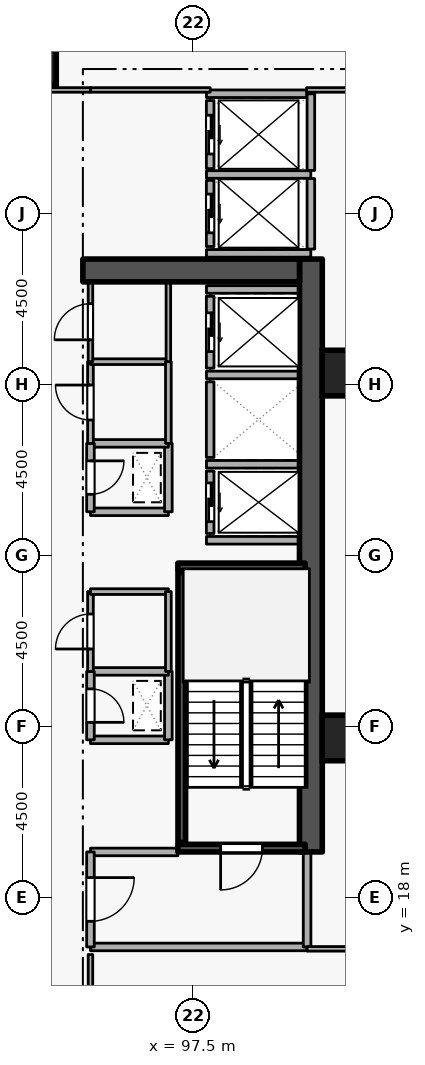
"""IFC4 building model, lengths in metres.
Left out: names, types, materials, properties, quantities, classifications, styles, units other than length and angle.
Written with IfcOpenShell. Run it as: python <this file> out.ifc"""

import sys

from ifc_helpers import new_model, si_unit, direction, frame, frame_2d, origin, origin_2d, place, context, subcontext, project, spatial, rectangle, extrude, element, fill, save


model = new_model("IFC4")
c1 = context("Model", 3, precision=1e-05, world=origin(), true_north=direction((0.0, 1.0)))
c2 = subcontext(c1, "Body", "Model", "MODEL_VIEW")
j1 = project(units=[si_unit("LENGTHUNIT", "METRE"), si_unit("PLANEANGLEUNIT", "RADIAN")], contexts=[c1])
p1 = place(None, origin())
s1 = spatial("IfcSite", under=j1, at=p1, CompositionType="ELEMENT")
p2 = place(p1, origin())
s2 = spatial("IfcBuilding", under=s1, at=p2, CompositionType="ELEMENT")
p3 = place(p2, frame((0.0, 0.0, 112.5)))
s3 = spatial("IfcBuildingStorey", under=s2, at=p3, CompositionType="ELEMENT", Elevation=112.5)
p4 = place(p3, frame((100.6, 19.2, 0.0), z_axis=(0.0, 0.0, 1.0), x_axis=(0.0, 1.0, 0.0)))
e1 = element("IfcWall", 1, at=p4, inside=s3, PredefinedType="SHEAR", context=c2, shape_type="SweptSolid", body=[
    extrude(rectangle(XDim=15.6, YDim=0.6, at=frame_2d((7.8, 0.0))), origin(), (0.0, 0.0, 1.0), 3.6),
])
p5 = place(p3, frame((94.6, 34.5, 0.0), z_axis=(0.0, 0.0, 1.0), x_axis=(1.0, 0.0, 0.0)))
e2 = element("IfcWall", 2, at=p5, inside=s3, PredefinedType="SHEAR", context=c2, shape_type="SweptSolid", body=[
    extrude(rectangle(XDim=5.7, YDim=0.6, at=frame_2d((2.85, 0.0))), origin(), (0.0, 0.0, 1.0), 3.6),
])
for number, where, z_axis, x_axis in (
    (3, (93.3, 40.0, 0.0), (0.0, 0.0, 1.0), (1.0, 0.0, 0.0)),
    (4, (101.5, 22.2, 0.0), (0.0, 0.0, 1.0), (1.0, 0.0, 0.0)),
    (5, (101.5, 31.8, 0.0), (0.0, 0.0, 1.0), (1.0, 0.0, 0.0)),
):
    element("IfcColumn", number, at=place(p3, frame(where, z_axis=z_axis, x_axis=x_axis)), inside=s3, PredefinedType="COLUMN", context=c2, shape_type="SweptSolid", body=[
        extrude(rectangle(XDim=1.2, YDim=1.2, at=origin_2d()), origin(), (0.0, 0.0, 1.0), 3.6),
    ])
p6 = place(p3, frame((97.95, 29.22, 0.0), z_axis=(0.0, 0.0, 1.0), x_axis=(0.0, -1.0, 0.0)))
e6 = element("IfcWall", 6, at=p6, inside=s3, PredefinedType="STANDARD", context=c2, shape_type="SweptSolid", body=[
    extrude(rectangle(XDim=1.64, YDim=0.2, at=frame_2d((0.82, 0.0))), origin(), (0.0, 0.0, 1.0), 3.34),
])
p7 = place(p6, frame((0.31, 0.0, 0.0)))
e7 = element("IfcOpeningElement", 7, at=p7, cuts=e6, PredefinedType="OPENING", context=c2, shape_type="SweptSolid", body=[
    extrude(rectangle(XDim=1.02, YDim=2.06, at=frame_2d((0.51, 1.03))), frame((0.0, 0.11, 0.0), z_axis=(0.0, -1.0, 0.0), x_axis=(1.0, 0.0, 0.0)), (0.0, 0.0, 1.0), 0.22),
])
p8 = place(p3, frame((97.95, 31.57, 0.0), z_axis=(0.0, 0.0, 1.0), x_axis=(0.0, -1.0, 0.0)))
e8 = element("IfcWall", 8, at=p8, inside=s3, PredefinedType="STANDARD", context=c2, shape_type="SweptSolid", body=[
    extrude(rectangle(XDim=1.99, YDim=0.2, at=frame_2d((0.995, 0.0))), origin(), (0.0, 0.0, 1.0), 3.34),
])
p9 = place(p3, frame((97.95, 33.82, 0.0), z_axis=(0.0, 0.0, 1.0), x_axis=(0.0, -1.0, 0.0)))
e9 = element("IfcWall", 9, at=p9, inside=s3, PredefinedType="STANDARD", context=c2, shape_type="SweptSolid", body=[
    extrude(rectangle(XDim=1.89, YDim=0.2, at=frame_2d((0.945, 0.0))), origin(), (0.0, 0.0, 1.0), 3.34),
])
p10 = place(p9, frame((0.435, 0.0, 0.0)))
e10 = element("IfcOpeningElement", 10, at=p10, cuts=e9, PredefinedType="OPENING", context=c2, shape_type="SweptSolid", body=[
    extrude(rectangle(XDim=1.02, YDim=2.06, at=frame_2d((0.51, 1.03))), frame((0.0, 0.11, 0.0), z_axis=(0.0, -1.0, 0.0), x_axis=(1.0, 0.0, 0.0)), (0.0, 0.0, 1.0), 0.22),
])
p11 = place(p3, frame((97.95, 36.87, 0.0), z_axis=(0.0, 0.0, 1.0), x_axis=(0.0, -1.0, 0.0)))
e11 = element("IfcWall", 11, at=p11, inside=s3, PredefinedType="STANDARD", context=c2, shape_type="SweptSolid", body=[
    extrude(rectangle(XDim=1.74, YDim=0.2, at=frame_2d((0.87, 0.0))), origin(), (0.0, 0.0, 1.0), 3.34),
])
p12 = place(p11, frame((0.36, 0.0, 0.0)))
e12 = element("IfcOpeningElement", 12, at=p12, cuts=e11, PredefinedType="OPENING", context=c2, shape_type="SweptSolid", body=[
    extrude(rectangle(XDim=1.02, YDim=2.06, at=frame_2d((0.51, 1.03))), frame((0.0, 0.11, 0.0), z_axis=(0.0, -1.0, 0.0), x_axis=(1.0, 0.0, 0.0)), (0.0, 0.0, 1.0), 0.22),
])
p13 = place(p3, frame((97.95, 38.97, 0.0), z_axis=(0.0, 0.0, 1.0), x_axis=(0.0, -1.0, 0.0)))
e13 = element("IfcWall", 13, at=p13, inside=s3, PredefinedType="STANDARD", context=c2, shape_type="SweptSolid", body=[
    extrude(rectangle(XDim=1.79, YDim=0.2, at=frame_2d((0.895, 0.0))), origin(), (0.0, 0.0, 1.0), 3.34),
])
p14 = place(p13, frame((0.385, 0.0, 0.0)))
e14 = element("IfcOpeningElement", 14, at=p14, cuts=e13, PredefinedType="OPENING", context=c2, shape_type="SweptSolid", body=[
    extrude(rectangle(XDim=1.02, YDim=2.06, at=frame_2d((0.51, 1.03))), frame((0.0, 0.11, 0.0), z_axis=(0.0, -1.0, 0.0), x_axis=(1.0, 0.0, 0.0)), (0.0, 0.0, 1.0), 0.22),
])
for number, where, z_axis, x_axis in (
    (15, (97.852, 29.4, 0.0), (0.0, 0.0, 1.0), (1.0, 0.0, 0.0)),
    (16, (97.852, 27.4, 0.0), (0.0, 0.0, 1.0), (1.0, 0.0, 0.0)),
    (17, (97.852, 31.75, 0.0), (0.0, 0.0, 1.0), (1.0, 0.0, 0.0)),
    (18, (97.852, 34.0, 0.0), (0.0, 0.0, 1.0), (1.0, 0.0, 0.0)),
):
    element("IfcWall", number, at=place(p3, frame(where, z_axis=z_axis, x_axis=x_axis)), inside=s3, PredefinedType="STANDARD", context=c2, shape_type="SweptSolid", body=[
        extrude(rectangle(XDim=2.436, YDim=0.2, at=frame_2d((1.218, 0.0))), origin(), (0.0, 0.0, 1.0), 3.34),
    ])
for number, where, z_axis, x_axis in (
    (19, (97.852, 37.025, 0.0), (0.0, 0.0, 1.0), (1.0, 0.0, 0.0)),
    (20, (97.852, 34.95, 0.0), (0.0, 0.0, 1.0), (1.0, 0.0, 0.0)),
):
    element("IfcWall", number, at=place(p3, frame(where, z_axis=z_axis, x_axis=x_axis)), inside=s3, PredefinedType="STANDARD", context=c2, shape_type="SweptSolid", body=[
        extrude(rectangle(XDim=2.746, YDim=0.2, at=frame_2d((1.373, 0.0))), origin(), (0.0, 0.0, 1.0), 3.34),
    ])
p15 = place(p3, frame((100.6, 35.062, 0.0), z_axis=(0.0, 0.0, 1.0), x_axis=(0.0, 1.0, 0.0)))
e21 = element("IfcWall", 21, at=p15, inside=s3, PredefinedType="STANDARD", context=c2, shape_type="SweptSolid", body=[
    extrude(rectangle(XDim=1.856, YDim=0.2, at=frame_2d((0.928, 0.0))), origin(), (0.0, 0.0, 1.0), 3.34),
])
p16 = place(p3, frame((100.6, 37.132, 0.0), z_axis=(0.0, 0.0, 1.0), x_axis=(0.0, 1.0, 0.0)))
e22 = element("IfcWall", 22, at=p16, inside=s3, PredefinedType="STANDARD", context=c2, shape_type="SweptSolid", body=[
    extrude(rectangle(XDim=2.016, YDim=0.2, at=frame_2d((1.008, 0.0))), origin(), (0.0, 0.0, 1.0), 3.34),
])
p17 = place(p3, frame((97.852, 39.15, 0.0), z_axis=(0.0, 0.0, 1.0), x_axis=(1.0, 0.0, 0.0)))
e23 = element("IfcWall", 23, at=p17, inside=s3, PredefinedType="STANDARD", context=c2, shape_type="SweptSolid", body=[
    extrude(rectangle(XDim=2.636, YDim=0.2, at=frame_2d((1.318, 0.0))), origin(), (0.0, 0.0, 1.0), 3.34),
])
p18 = place(p3, frame((100.45, 19.3, 0.0), z_axis=(0.0, 0.0, 1.0), x_axis=(-1.0, 0.0, 0.0)))
e24 = element("IfcWall", 24, at=p18, inside=s3, PredefinedType="SHEAR", context=c2, shape_type="SweptSolid", body=[
    extrude(rectangle(XDim=3.35, YDim=0.2, at=frame_2d((1.675, 0.0))), origin(), (0.0, 0.0, 1.0), 3.6),
])
p19 = place(p18, frame((1.125, 0.0, 0.0)))
e25 = element("IfcOpeningElement", 25, at=p19, cuts=e24, PredefinedType="OPENING", context=c2, shape_type="SweptSolid", body=[
    extrude(rectangle(XDim=1.1, YDim=2.1, at=frame_2d((0.55, 1.05))), frame((0.0, 0.11, 0.0), z_axis=(0.0, -1.0, 0.0), x_axis=(1.0, 0.0, 0.0)), (0.0, 0.0, 1.0), 0.22),
])
p20 = place(p3, frame((97.1, 26.7, 0.0), z_axis=(0.0, 0.0, 1.0), x_axis=(1.0, 0.0, 0.0)))
e26 = element("IfcWall", 26, at=p20, inside=s3, PredefinedType="SHEAR", context=c2, shape_type="SweptSolid", body=[
    extrude(rectangle(XDim=3.35, YDim=0.2, at=frame_2d((1.675, 0.0))), origin(), (0.0, 0.0, 1.0), 3.6),
])
p21 = place(p3, frame((97.203, 26.55, 0.0), z_axis=(0.0, 0.0, 1.0), x_axis=(0.0, -1.0, 0.0)))
e27 = element("IfcWall", 27, at=p21, inside=s3, PredefinedType="SHEAR", context=c2, shape_type="SweptSolid", body=[
    extrude(rectangle(XDim=7.1, YDim=0.2, at=frame_2d((3.55, 0.0))), origin(), (0.0, 0.0, 1.0), 3.6),
])
p22 = place(p3, frame((94.8, 16.7, 0.0), z_axis=(0.0, 0.0, 1.0), x_axis=(1.0, 0.0, 0.0)))
e28 = element("IfcWall", 28, at=p22, inside=s3, PredefinedType="STANDARD", context=c2, shape_type="SweptSolid", body=[
    extrude(rectangle(XDim=5.7, YDim=0.2, at=frame_2d((2.85, 0.0))), origin(), (0.0, 0.0, 1.0), 3.34),
])
p23 = place(p3, frame((100.5, 16.7, 0.0), z_axis=(0.0, 0.0, 1.0), x_axis=(0.0, 1.0, 0.0)))
e29 = element("IfcWall", 29, at=p23, inside=s3, PredefinedType="STANDARD", context=c2, shape_type="SweptSolid", body=[
    extrude(rectangle(XDim=2.5, YDim=0.2, at=frame_2d((1.25, 0.0))), origin(), (0.0, 0.0, 1.0), 3.34),
])
p24 = place(p3, frame((97.1, 19.2, 0.0), z_axis=(0.0, 0.0, 1.0), x_axis=(-1.0, 0.0, 0.0)))
e30 = element("IfcWall", 30, at=p24, inside=s3, PredefinedType="STANDARD", context=c2, shape_type="SweptSolid", body=[
    extrude(rectangle(XDim=2.3, YDim=0.2, at=frame_2d((1.15, 0.0))), origin(), (0.0, 0.0, 1.0), 2.545),
])
p25 = place(p3, frame((94.8, 19.2, 0.0), z_axis=(0.0, 0.0, 1.0), x_axis=(0.0, -1.0, 0.0)))
e31 = element("IfcWall", 31, at=p25, inside=s3, PredefinedType="STANDARD", context=c2, shape_type="SweptSolid", body=[
    extrude(rectangle(XDim=2.5, YDim=0.2, at=frame_2d((1.25, 0.0))), origin(), (0.0, 0.0, 1.0), 3.34),
])
p26 = place(p25, frame((0.675, 0.0, 0.0)))
e32 = element("IfcOpeningElement", 32, at=p26, cuts=e31, PredefinedType="OPENING", context=c2, shape_type="SweptSolid", body=[
    extrude(rectangle(XDim=1.15, YDim=2.1, at=frame_2d((0.575, 1.05))), frame((0.0, 0.11, 0.0), z_axis=(0.0, -1.0, 0.0), x_axis=(1.0, 0.0, 0.0)), (0.0, 0.0, 1.0), 0.22),
])
p27 = place(p3, frame((94.8, 28.15, 0.0), z_axis=(0.0, 0.0, 1.0), x_axis=(1.0, 0.0, 0.0)))
e33 = element("IfcWall", 33, at=p27, inside=s3, PredefinedType="STANDARD", context=c2, shape_type="SweptSolid", body=[
    extrude(rectangle(XDim=2.05, YDim=0.2, at=frame_2d((1.025, 0.0))), origin(), (0.0, 0.0, 1.0), 3.34),
])
p28 = place(p3, frame((96.85, 28.15, 0.0), z_axis=(0.0, 0.0, 1.0), x_axis=(0.0, 1.0, 0.0)))
e34 = element("IfcWall", 34, at=p28, inside=s3, PredefinedType="STANDARD", context=c2, shape_type="SweptSolid", body=[
    extrude(rectangle(XDim=1.8, YDim=0.2, at=frame_2d((0.9, 0.0))), origin(), (0.0, 0.0, 1.0), 3.34),
])
p29 = place(p3, frame((96.85, 29.95, 0.0), z_axis=(0.0, 0.0, 1.0), x_axis=(-1.0, 0.0, 0.0)))
e35 = element("IfcWall", 35, at=p29, inside=s3, PredefinedType="STANDARD", context=c2, shape_type="SweptSolid", body=[
    extrude(rectangle(XDim=2.05, YDim=0.2, at=frame_2d((1.025, 0.0))), origin(), (0.0, 0.0, 1.0), 3.34),
])
p30 = place(p3, frame((94.8, 29.95, 0.0), z_axis=(0.0, 0.0, 1.0), x_axis=(0.0, -1.0, 0.0)))
e36 = element("IfcWall", 36, at=p30, inside=s3, PredefinedType="STANDARD", context=c2, shape_type="SweptSolid", body=[
    extrude(rectangle(XDim=1.8, YDim=0.2, at=frame_2d((0.9, 0.0))), origin(), (0.0, 0.0, 1.0), 3.34),
])
p31 = place(p30, frame((0.46, 0.0, 0.0)))
e37 = element("IfcOpeningElement", 37, at=p31, cuts=e36, PredefinedType="OPENING", context=c2, shape_type="SweptSolid", body=[
    extrude(rectangle(XDim=0.88, YDim=2.04, at=frame_2d((0.44, 1.02))), frame((0.0, 0.11, 0.0), z_axis=(0.0, -1.0, 0.0), x_axis=(1.0, 0.0, 0.0)), (0.0, 0.0, 1.0), 0.22),
])
p32 = place(p3, frame((94.8, 22.15, 0.0), z_axis=(0.0, 0.0, 1.0), x_axis=(1.0, 0.0, 0.0)))
e38 = element("IfcWall", 38, at=p32, inside=s3, PredefinedType="STANDARD", context=c2, shape_type="SweptSolid", body=[
    extrude(rectangle(XDim=2.05, YDim=0.2, at=frame_2d((1.025, 0.0))), origin(), (0.0, 0.0, 1.0), 3.34),
])
p33 = place(p3, frame((96.85, 22.15, 0.0), z_axis=(0.0, 0.0, 1.0), x_axis=(0.0, 1.0, 0.0)))
e39 = element("IfcWall", 39, at=p33, inside=s3, PredefinedType="STANDARD", context=c2, shape_type="SweptSolid", body=[
    extrude(rectangle(XDim=1.8, YDim=0.2, at=frame_2d((0.9, 0.0))), origin(), (0.0, 0.0, 1.0), 3.34),
])
p34 = place(p3, frame((96.85, 23.95, 0.0), z_axis=(0.0, 0.0, 1.0), x_axis=(-1.0, 0.0, 0.0)))
e40 = element("IfcWall", 40, at=p34, inside=s3, PredefinedType="STANDARD", context=c2, shape_type="SweptSolid", body=[
    extrude(rectangle(XDim=2.05, YDim=0.2, at=frame_2d((1.025, 0.0))), origin(), (0.0, 0.0, 1.0), 3.34),
])
p35 = place(p3, frame((94.8, 23.95, 0.0), z_axis=(0.0, 0.0, 1.0), x_axis=(0.0, -1.0, 0.0)))
e41 = element("IfcWall", 41, at=p35, inside=s3, PredefinedType="STANDARD", context=c2, shape_type="SweptSolid", body=[
    extrude(rectangle(XDim=1.8, YDim=0.2, at=frame_2d((0.9, 0.0))), origin(), (0.0, 0.0, 1.0), 3.34),
])
p36 = place(p35, frame((0.46, 0.0, 0.0)))
e42 = element("IfcOpeningElement", 42, at=p36, cuts=e41, PredefinedType="OPENING", context=c2, shape_type="SweptSolid", body=[
    extrude(rectangle(XDim=0.88, YDim=2.04, at=frame_2d((0.44, 1.02))), frame((0.0, 0.11, 0.0), z_axis=(0.0, -1.0, 0.0), x_axis=(1.0, 0.0, 0.0)), (0.0, 0.0, 1.0), 0.22),
])
p37 = place(p3, frame((94.8, 23.95, 0.0), z_axis=(0.0, 0.0, 1.0), x_axis=(0.0, 1.0, 0.0)))
e43 = element("IfcWall", 43, at=p37, inside=s3, PredefinedType="PARTITIONING", context=c2, shape_type="SweptSolid", body=[
    extrude(rectangle(XDim=2.1, YDim=0.15, at=frame_2d((1.05, 0.0))), origin(), (0.0, 0.0, 1.0), 3.34),
])
p38 = place(p37, frame((0.59, 0.0, 0.0)))
e44 = element("IfcOpeningElement", 44, at=p38, cuts=e43, PredefinedType="OPENING", context=c2, shape_type="SweptSolid", body=[
    extrude(rectangle(XDim=0.92, YDim=2.08, at=frame_2d((0.46, 1.04))), frame((0.0, 0.085, 0.0), z_axis=(0.0, -1.0, 0.0), x_axis=(1.0, 0.0, 0.0)), (0.0, 0.0, 1.0), 0.17),
])
p39 = place(p3, frame((94.8, 26.05, 0.0), z_axis=(0.0, 0.0, 1.0), x_axis=(1.0, 0.0, 0.0)))
e45 = element("IfcWall", 45, at=p39, inside=s3, PredefinedType="PARTITIONING", context=c2, shape_type="SweptSolid", body=[
    extrude(rectangle(XDim=2.05, YDim=0.15, at=frame_2d((1.025, 0.0))), origin(), (0.0, 0.0, 1.0), 3.34),
])
p40 = place(p3, frame((96.85, 26.05, 0.0), z_axis=(0.0, 0.0, 1.0), x_axis=(0.0, -1.0, 0.0)))
e46 = element("IfcWall", 46, at=p40, inside=s3, PredefinedType="PARTITIONING", context=c2, shape_type="SweptSolid", body=[
    extrude(rectangle(XDim=2.1, YDim=0.15, at=frame_2d((1.05, 0.0))), origin(), (0.0, 0.0, 1.0), 3.34),
])
p41 = place(p3, frame((94.8, 29.95, 0.0), z_axis=(0.0, 0.0, 1.0), x_axis=(0.0, 1.0, 0.0)))
e47 = element("IfcWall", 47, at=p41, inside=s3, PredefinedType="PARTITIONING", context=c2, shape_type="SweptSolid", body=[
    extrude(rectangle(XDim=2.15, YDim=0.15, at=frame_2d((1.075, 0.0))), origin(), (0.0, 0.0, 1.0), 3.34),
])
p42 = place(p41, frame((0.615, 0.0, 0.0)))
e48 = element("IfcOpeningElement", 48, at=p42, cuts=e47, PredefinedType="OPENING", context=c2, shape_type="SweptSolid", body=[
    extrude(rectangle(XDim=0.92, YDim=2.08, at=frame_2d((0.46, 1.04))), frame((0.0, 0.085, 0.0), z_axis=(0.0, -1.0, 0.0), x_axis=(1.0, 0.0, 0.0)), (0.0, 0.0, 1.0), 0.17),
])
p43 = place(p3, frame((94.8, 32.1, 0.0), z_axis=(0.0, 0.0, 1.0), x_axis=(1.0, 0.0, 0.0)))
e49 = element("IfcWall", 49, at=p43, inside=s3, PredefinedType="PARTITIONING", context=c2, shape_type="SweptSolid", body=[
    extrude(rectangle(XDim=2.05, YDim=0.15, at=frame_2d((1.025, 0.0))), origin(), (0.0, 0.0, 1.0), 3.34),
])
p44 = place(p3, frame((96.85, 32.1, 0.0), z_axis=(0.0, 0.0, 1.0), x_axis=(0.0, -1.0, 0.0)))
e50 = element("IfcWall", 50, at=p44, inside=s3, PredefinedType="PARTITIONING", context=c2, shape_type="SweptSolid", body=[
    extrude(rectangle(XDim=2.15, YDim=0.15, at=frame_2d((1.075, 0.0))), origin(), (0.0, 0.0, 1.0), 3.34),
])
p45 = place(p3, frame((94.8, 32.1, 0.0), z_axis=(0.0, 0.0, 1.0), x_axis=(0.0, 1.0, 0.0)))
e51 = element("IfcWall", 51, at=p45, inside=s3, PredefinedType="PARTITIONING", context=c2, shape_type="SweptSolid", body=[
    extrude(rectangle(XDim=2.1, YDim=0.12, at=frame_2d((1.05, 0.0))), origin(), (0.0, 0.0, 1.0), 3.34),
])
p46 = place(p45, frame((0.575, 0.0, 0.0)))
e52 = element("IfcOpeningElement", 52, at=p46, cuts=e51, PredefinedType="OPENING", context=c2, shape_type="SweptSolid", body=[
    extrude(rectangle(XDim=0.95, YDim=2.1, at=frame_2d((0.475, 1.05))), frame((0.0, 0.07, 0.0), z_axis=(0.0, -1.0, 0.0), x_axis=(1.0, 0.0, 0.0)), (0.0, 0.0, 1.0), 0.14),
])
p47 = place(p3, frame((96.85, 34.2, 0.0), z_axis=(0.0, 0.0, 1.0), x_axis=(0.0, -1.0, 0.0)))
e53 = element("IfcWall", 53, at=p47, inside=s3, PredefinedType="PARTITIONING", context=c2, shape_type="SweptSolid", body=[
    extrude(rectangle(XDim=2.1, YDim=0.12, at=frame_2d((1.05, 0.0))), origin(), (0.0, 0.0, 1.0), 3.34),
])
p48 = place(p3, frame((94.8, 14.75, 0.0), z_axis=(0.0, 0.0, 1.0), x_axis=(0.0, 1.0, 0.0)))
e54 = element("IfcWall", 54, at=p48, inside=s3, PredefinedType="PARTITIONING", context=c2, shape_type="SweptSolid", body=[
    extrude(rectangle(XDim=1.75, YDim=0.12, at=frame_2d((0.875, 0.0))), origin(), (0.0, 0.0, 1.0), 3.34),
])
p49 = place(p3, frame((100.5, 16.65, 0.0), z_axis=(0.0, 0.0, 1.0), x_axis=(1.0, 0.0, 0.0)))
e55 = element("IfcWall", 55, at=p49, inside=s3, PredefinedType="PARTITIONING", context=c2, shape_type="SweptSolid", body=[
    extrude(rectangle(XDim=5.92, YDim=0.12, at=frame_2d((2.96, 0.0))), origin(), (0.0, 0.0, 1.0), 3.34),
])
p50 = place(p3, frame((106.42, 39.25, 0.0), z_axis=(0.0, 0.0, 1.0), x_axis=(-1.0, 0.0, 0.0)))
e56 = element("IfcWall", 56, at=p50, inside=s3, PredefinedType="PARTITIONING", context=c2, shape_type="SweptSolid", body=[
    extrude(rectangle(XDim=5.932, YDim=0.12, at=frame_2d((2.966, 0.0))), origin(), (0.0, 0.0, 1.0), 3.34),
])
p51 = place(p3, frame((97.95, 39.25, 0.0), z_axis=(0.0, 0.0, 1.0), x_axis=(-1.0, 0.0, 0.0)))
e57 = element("IfcWall", 57, at=p51, inside=s3, PredefinedType="PARTITIONING", context=c2, shape_type="SweptSolid", body=[
    extrude(rectangle(XDim=3.15, YDim=0.12, at=frame_2d((1.575, 0.0))), origin(), (0.0, 0.0, 1.0), 3.34),
])
p52 = place(p3, frame((94.8, 39.25, 0.0), z_axis=(0.0, 0.0, 1.0), x_axis=(-1.0, 0.0, 0.0)))
e58 = element("IfcWall", 58, at=p52, inside=s3, PredefinedType="PARTITIONING", context=c2, shape_type="SweptSolid", body=[
    extrude(rectangle(XDim=1.85, YDim=0.12, at=frame_2d((0.925, 0.0))), origin(), (0.0, 0.0, 1.0), 3.34),
])
p53 = place(p7, origin())
e59 = element("IfcDoor", 59, at=p53, inside=s3, OperationType="SLIDING_TO_LEFT", PredefinedType="DOOR", context=c2, shape_type="SweptSolid", body=[
    extrude(rectangle(XDim=1.02, YDim=2.06, at=frame_2d((0.51, 1.03))), frame((0.0, 0.025, 0.0), z_axis=(0.0, -1.0, 0.0), x_axis=(1.0, 0.0, 0.0)), (0.0, 0.0, 1.0), 0.05),
])
fill(e7, e59)
p54 = place(p10, origin())
e60 = element("IfcDoor", 60, at=p54, inside=s3, OperationType="SLIDING_TO_LEFT", PredefinedType="DOOR", context=c2, shape_type="SweptSolid", body=[
    extrude(rectangle(XDim=1.02, YDim=2.06, at=frame_2d((0.51, 1.03))), frame((0.0, 0.025, 0.0), z_axis=(0.0, -1.0, 0.0), x_axis=(1.0, 0.0, 0.0)), (0.0, 0.0, 1.0), 0.05),
])
fill(e10, e60)
p55 = place(p12, origin())
e61 = element("IfcDoor", 61, at=p55, inside=s3, OperationType="SLIDING_TO_LEFT", PredefinedType="DOOR", context=c2, shape_type="SweptSolid", body=[
    extrude(rectangle(XDim=1.02, YDim=2.06, at=frame_2d((0.51, 1.03))), frame((0.0, 0.025, 0.0), z_axis=(0.0, -1.0, 0.0), x_axis=(1.0, 0.0, 0.0)), (0.0, 0.0, 1.0), 0.05),
])
fill(e12, e61)
p56 = place(p14, origin())
e62 = element("IfcDoor", 62, at=p56, inside=s3, OperationType="SLIDING_TO_LEFT", PredefinedType="DOOR", context=c2, shape_type="SweptSolid", body=[
    extrude(rectangle(XDim=1.02, YDim=2.06, at=frame_2d((0.51, 1.03))), frame((0.0, 0.025, 0.0), z_axis=(0.0, -1.0, 0.0), x_axis=(1.0, 0.0, 0.0)), (0.0, 0.0, 1.0), 0.05),
])
fill(e14, e62)
p57 = place(p19, origin())
e63 = element("IfcDoor", 63, at=p57, inside=s3, OperationType="SINGLE_SWING_RIGHT", PredefinedType="DOOR", context=c2, shape_type="SweptSolid", body=[
    extrude(rectangle(XDim=1.1, YDim=2.1, at=frame_2d((0.55, 1.05))), frame((0.0, 0.025, 0.0), z_axis=(0.0, -1.0, 0.0), x_axis=(1.0, 0.0, 0.0)), (0.0, 0.0, 1.0), 0.05),
])
fill(e25, e63)
p58 = place(p26, origin())
e64 = element("IfcDoor", 64, at=p58, inside=s3, OperationType="SINGLE_SWING_LEFT", PredefinedType="DOOR", context=c2, shape_type="SweptSolid", body=[
    extrude(rectangle(XDim=1.15, YDim=2.1, at=frame_2d((0.575, 1.05))), frame((0.0, 0.025, 0.0), z_axis=(0.0, -1.0, 0.0), x_axis=(1.0, 0.0, 0.0)), (0.0, 0.0, 1.0), 0.05),
])
fill(e32, e64)
p59 = place(p31, origin())
e65 = element("IfcDoor", 65, at=p59, inside=s3, OperationType="SINGLE_SWING_LEFT", PredefinedType="DOOR", context=c2, shape_type="SweptSolid", body=[
    extrude(rectangle(XDim=0.88, YDim=2.04, at=frame_2d((0.44, 1.02))), frame((0.0, 0.025, 0.0), z_axis=(0.0, -1.0, 0.0), x_axis=(1.0, 0.0, 0.0)), (0.0, 0.0, 1.0), 0.05),
])
fill(e37, e65)
p60 = place(p36, origin())
e66 = element("IfcDoor", 66, at=p60, inside=s3, OperationType="SINGLE_SWING_RIGHT", PredefinedType="DOOR", context=c2, shape_type="SweptSolid", body=[
    extrude(rectangle(XDim=0.88, YDim=2.04, at=frame_2d((0.44, 1.02))), frame((0.0, 0.025, 0.0), z_axis=(0.0, -1.0, 0.0), x_axis=(1.0, 0.0, 0.0)), (0.0, 0.0, 1.0), 0.05),
])
fill(e42, e66)
p61 = place(p38, origin())
e67 = element("IfcDoor", 67, at=p61, inside=s3, OperationType="SINGLE_SWING_LEFT", PredefinedType="DOOR", context=c2, shape_type="SweptSolid", body=[
    extrude(rectangle(XDim=0.92, YDim=2.08, at=frame_2d((0.46, 1.04))), frame((0.0, 0.025, 0.0), z_axis=(0.0, -1.0, 0.0), x_axis=(1.0, 0.0, 0.0)), (0.0, 0.0, 1.0), 0.05),
])
fill(e44, e67)
p62 = place(p42, origin())
e68 = element("IfcDoor", 68, at=p62, inside=s3, OperationType="SINGLE_SWING_RIGHT", PredefinedType="DOOR", context=c2, shape_type="SweptSolid", body=[
    extrude(rectangle(XDim=0.92, YDim=2.08, at=frame_2d((0.46, 1.04))), frame((0.0, 0.025, 0.0), z_axis=(0.0, -1.0, 0.0), x_axis=(1.0, 0.0, 0.0)), (0.0, 0.0, 1.0), 0.05),
])
fill(e48, e68)
p63 = place(p46, origin())
e69 = element("IfcDoor", 69, at=p63, inside=s3, OperationType="SINGLE_SWING_LEFT", PredefinedType="DOOR", context=c2, shape_type="SweptSolid", body=[
    extrude(rectangle(XDim=0.95, YDim=2.1, at=frame_2d((0.475, 1.05))), frame((0.0, 0.025, 0.0), z_axis=(0.0, -1.0, 0.0), x_axis=(1.0, 0.0, 0.0)), (0.0, 0.0, 1.0), 0.05),
])
fill(e52, e69)
save(model, sys.argv[1])
